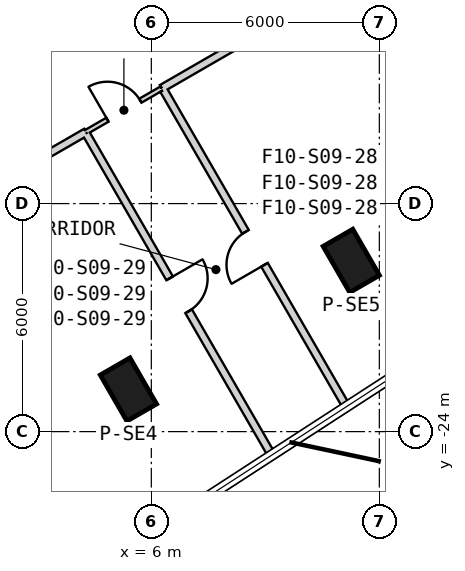
"""IFC4 building model, lengths in metres.
Left out: names, types, materials, properties, quantities, classifications, styles, units other than length and angle.
Written with IfcOpenShell. Run it as: python <this file> out.ifc"""

import sys

from ifc_helpers import new_model, si_unit, direction, frame, frame_2d, origin, origin_2d, place, context, subcontext, project, spatial, rectangle, extrude, element, fill, save


model = new_model("IFC4")
c1 = context("Model", 3, precision=1e-05, world=origin(), true_north=direction((0.0, 1.0)))
c2 = subcontext(c1, "Body", "Model", "MODEL_VIEW")
j1 = project(units=[si_unit("LENGTHUNIT", "METRE"), si_unit("PLANEANGLEUNIT", "RADIAN")], contexts=[c1])
p1 = place(None, origin())
s1 = spatial("IfcSite", under=j1, at=p1, CompositionType="ELEMENT")
p2 = place(p1, origin())
s2 = spatial("IfcBuilding", under=s1, at=p2, CompositionType="ELEMENT")
p3 = place(p2, frame((0.0, 0.0, 169.2)))
s3 = spatial("IfcBuildingStorey", under=s2, at=p3, CompositionType="ELEMENT", Elevation=169.2)
for number, where, z_axis, x_axis in (
    (1, (5.398, -22.892, -0.3), (0.0, 0.0, 1.0), (0.5, -0.866, 0.0)),
    (2, (11.262, -19.506, -0.3), (0.0, 0.0, 1.0), (0.5, -0.866, 0.0)),
):
    element("IfcColumn", number, at=place(p3, frame(where, z_axis=z_axis, x_axis=x_axis)), inside=s3, PredefinedType="COLUMN", context=c2, shape_type="SweptSolid", body=[
        extrude(rectangle(XDim=1.4, YDim=0.9, at=origin_2d()), origin(), (0.0, 0.0, 1.0), 4.3),
    ])
p4 = place(p3, frame((-7.825, -17.97, 0.0), z_axis=(0.0, 0.0, 1.0), x_axis=(0.866028369851, 0.499994862586, 0.0)))
e3 = element("IfcWall", 3, at=p4, inside=s3, PredefinedType="SHEAR", context=c2, shape_type="SweptSolid", body=[
    extrude(rectangle(XDim=31.523, YDim=0.9, at=frame_2d((15.762, 0.0))), origin(), (0.0, 0.0, 1.0), 4.0),
])
p5 = place(p4, frame((7.062, 0.0, 0.0)))
e4 = element("IfcOpeningElement", 4, at=p5, cuts=e3, PredefinedType="OPENING", context=c2, shape_type="SweptSolid", body=[
    extrude(rectangle(XDim=1.2, YDim=2.4, at=frame_2d((0.6, 1.2))), frame((0.0, 0.46, 0.0), z_axis=(0.0, -1.0, 0.0), x_axis=(1.0, 0.0, 0.0)), (0.0, 0.0, 1.0), 0.92),
])
p6 = place(p4, frame((9.762, 0.0, 0.0)))
e5 = element("IfcOpeningElement", 5, at=p6, cuts=e3, PredefinedType="OPENING", context=c2, shape_type="SweptSolid", body=[
    extrude(rectangle(XDim=1.2, YDim=2.4, at=frame_2d((0.6, 1.2))), frame((0.0, 0.46, 0.0), z_axis=(0.0, -1.0, 0.0), x_axis=(1.0, 0.0, 0.0)), (0.0, 0.0, 1.0), 0.92),
])
p7 = place(p4, frame((12.462, 0.0, 0.0)))
e6 = element("IfcOpeningElement", 6, at=p7, cuts=e3, PredefinedType="OPENING", context=c2, shape_type="SweptSolid", body=[
    extrude(rectangle(XDim=1.2, YDim=2.4, at=frame_2d((0.6, 1.2))), frame((0.0, 0.46, 0.0), z_axis=(0.0, -1.0, 0.0), x_axis=(1.0, 0.0, 0.0)), (0.0, 0.0, 1.0), 0.92),
])
p8 = place(p4, frame((15.162, 0.0, 0.0)))
e7 = element("IfcOpeningElement", 7, at=p8, cuts=e3, PredefinedType="OPENING", context=c2, shape_type="SweptSolid", body=[
    extrude(rectangle(XDim=1.2, YDim=2.4, at=frame_2d((0.6, 1.2))), frame((0.0, 0.46, 0.0), z_axis=(0.0, -1.0, 0.0), x_axis=(1.0, 0.0, 0.0)), (0.0, 0.0, 1.0), 0.92),
])
p9 = place(p4, frame((17.862, 0.0, 0.0)))
e8 = element("IfcOpeningElement", 8, at=p9, cuts=e3, PredefinedType="OPENING", context=c2, shape_type="SweptSolid", body=[
    extrude(rectangle(XDim=1.2, YDim=2.4, at=frame_2d((0.6, 1.2))), frame((0.0, 0.46, 0.0), z_axis=(0.0, -1.0, 0.0), x_axis=(1.0, 0.0, 0.0)), (0.0, 0.0, 1.0), 0.92),
])
p10 = place(p4, frame((20.562, 0.0, 0.0)))
e9 = element("IfcOpeningElement", 9, at=p10, cuts=e3, PredefinedType="OPENING", context=c2, shape_type="SweptSolid", body=[
    extrude(rectangle(XDim=1.2, YDim=2.4, at=frame_2d((0.6, 1.2))), frame((0.0, 0.46, 0.0), z_axis=(0.0, -1.0, 0.0), x_axis=(1.0, 0.0, 0.0)), (0.0, 0.0, 1.0), 0.92),
])
p11 = place(p4, frame((26.712, 0.0, 0.0)))
e10 = element("IfcOpeningElement", 10, at=p11, cuts=e3, PredefinedType="OPENING", context=c2, shape_type="SweptSolid", body=[
    extrude(rectangle(XDim=1.2, YDim=2.4, at=frame_2d((0.6, 1.2))), frame((0.0, 0.46, 0.0), z_axis=(0.0, -1.0, 0.0), x_axis=(1.0, 0.0, 0.0)), (0.0, 0.0, 1.0), 0.92),
])
p12 = place(p4, frame((3.612, 0.0, 0.0)))
e11 = element("IfcOpeningElement", 11, at=p12, cuts=e3, PredefinedType="OPENING", context=c2, shape_type="SweptSolid", body=[
    extrude(rectangle(XDim=1.2, YDim=2.4, at=frame_2d((0.6, 1.2))), frame((0.0, 0.46, 0.0), z_axis=(0.0, -1.0, 0.0), x_axis=(1.0, 0.0, 0.0)), (0.0, 0.0, 1.0), 0.92),
])
p13 = place(p3, frame((4.283, -16.118, 0.0), z_axis=(0.0, 0.0, 1.0), x_axis=(0.866053019151, 0.499952165731, 0.0)))
e12 = element("IfcWall", 12, at=p13, inside=s3, PredefinedType="PARTITIONING", context=c2, shape_type="SweptSolid", body=[
    extrude(rectangle(XDim=2.3, YDim=0.12, at=frame_2d((1.15, 0.0))), origin(), (0.0, 0.0, 1.0), 3.7),
])
p14 = place(p13, frame((0.65, 0.0, 0.0)))
e13 = element("IfcOpeningElement", 13, at=p14, cuts=e12, PredefinedType="OPENING", context=c2, shape_type="SweptSolid", body=[
    extrude(rectangle(XDim=1.0, YDim=2.1, at=frame_2d((0.5, 1.05))), frame((0.0, 0.07, 0.0), z_axis=(0.0, -1.0, 0.0), x_axis=(1.0, 0.0, 0.0)), (0.0, 0.0, 1.0), 0.14),
])
p15 = place(p3, frame((-6.366, -22.266, 0.0), z_axis=(0.0, 0.0, 1.0), x_axis=(0.866024234898, 0.500002024564, 0.0)))
e14 = element("IfcWall", 14, at=p15, inside=s3, PredefinedType="PARTITIONING", context=c2, shape_type="SweptSolid", body=[
    extrude(rectangle(XDim=12.296, YDim=0.2, at=frame_2d((6.148, 0.0))), origin(), (0.0, 0.0, 1.0), 2.88),
])
p16 = place(p3, frame((6.275, -14.968, 0.0), z_axis=(0.0, 0.0, 1.0), x_axis=(0.866028424491, 0.499994767946, 0.0)))
e15 = element("IfcWall", 15, at=p16, inside=s3, PredefinedType="PARTITIONING", context=c2, shape_type="SweptSolid", body=[
    extrude(rectangle(XDim=18.496, YDim=0.2, at=frame_2d((9.248, 0.0))), origin(), (0.0, 0.0, 1.0), 2.88),
])
p17 = place(p3, frame((11.134, -23.344, 0.0), z_axis=(0.0, 0.0, 1.0), x_axis=(-0.50000792458, 0.866020828478, 0.0)))
e16 = element("IfcWall", 16, at=p17, inside=s3, PredefinedType="PARTITIONING", context=c2, shape_type="SweptSolid", body=[
    extrude(rectangle(XDim=9.624, YDim=0.2, at=frame_2d((4.812, 0.0))), origin(), (0.0, 0.0, 1.0), 3.7),
])
p18 = place(p17, frame((4.312, 0.0, 0.0)))
e17 = element("IfcOpeningElement", 17, at=p18, cuts=e16, PredefinedType="OPENING", context=c2, shape_type="SweptSolid", body=[
    extrude(rectangle(XDim=1.0, YDim=2.1, at=frame_2d((0.5, 1.05))), frame((0.0, 0.11, 0.0), z_axis=(0.0, -1.0, 0.0), x_axis=(1.0, 0.0, 0.0)), (0.0, 0.0, 1.0), 0.22),
])
p19 = place(p3, frame((4.295, -16.18, 0.0), z_axis=(0.0, 0.0, 1.0), x_axis=(0.500010870188, -0.866019127788, 0.0)))
e18 = element("IfcWall", 18, at=p19, inside=s3, PredefinedType="PARTITIONING", context=c2, shape_type="SweptSolid", body=[
    extrude(rectangle(XDim=9.745, YDim=0.2, at=frame_2d((4.873, 0.0))), origin(), (0.0, 0.0, 1.0), 3.7),
])
p20 = place(p19, frame((4.373, 0.0, 0.0)))
e19 = element("IfcOpeningElement", 19, at=p20, cuts=e18, PredefinedType="OPENING", context=c2, shape_type="SweptSolid", body=[
    extrude(rectangle(XDim=1.0, YDim=2.1, at=frame_2d((0.5, 1.05))), frame((0.0, 0.11, 0.0), z_axis=(0.0, -1.0, 0.0), x_axis=(1.0, 0.0, 0.0)), (0.0, 0.0, 1.0), 0.22),
])
p21 = place(p14, origin())
e20 = element("IfcDoor", 20, at=p21, inside=s3, OperationType="SINGLE_SWING_RIGHT", PredefinedType="NOTDEFINED", context=c2, shape_type="SweptSolid", body=[
    extrude(rectangle(XDim=1.0, YDim=2.1, at=frame_2d((0.5, 1.05))), frame((0.0, 0.025, 0.0), z_axis=(0.0, -1.0, 0.0), x_axis=(1.0, 0.0, 0.0)), (0.0, 0.0, 1.0), 0.05),
])
fill(e13, e20)
p22 = place(p18, origin())
e21 = element("IfcDoor", 21, at=p22, inside=s3, OperationType="SINGLE_SWING_LEFT", PredefinedType="USERDEFINED", context=c2, shape_type="SweptSolid", body=[
    extrude(rectangle(XDim=1.0, YDim=2.1, at=frame_2d((0.5, 1.05))), frame((0.0, 0.025, 0.0), z_axis=(0.0, -1.0, 0.0), x_axis=(1.0, 0.0, 0.0)), (0.0, 0.0, 1.0), 0.05),
])
fill(e17, e21)
p23 = place(p20, origin())
e22 = element("IfcDoor", 22, at=p23, inside=s3, OperationType="SINGLE_SWING_LEFT", PredefinedType="USERDEFINED", context=c2, shape_type="SweptSolid", body=[
    extrude(rectangle(XDim=1.0, YDim=2.1, at=frame_2d((0.5, 1.05))), frame((0.0, 0.025, 0.0), z_axis=(0.0, -1.0, 0.0), x_axis=(1.0, 0.0, 0.0)), (0.0, 0.0, 1.0), 0.05),
])
fill(e19, e22)
save(model, sys.argv[1])
